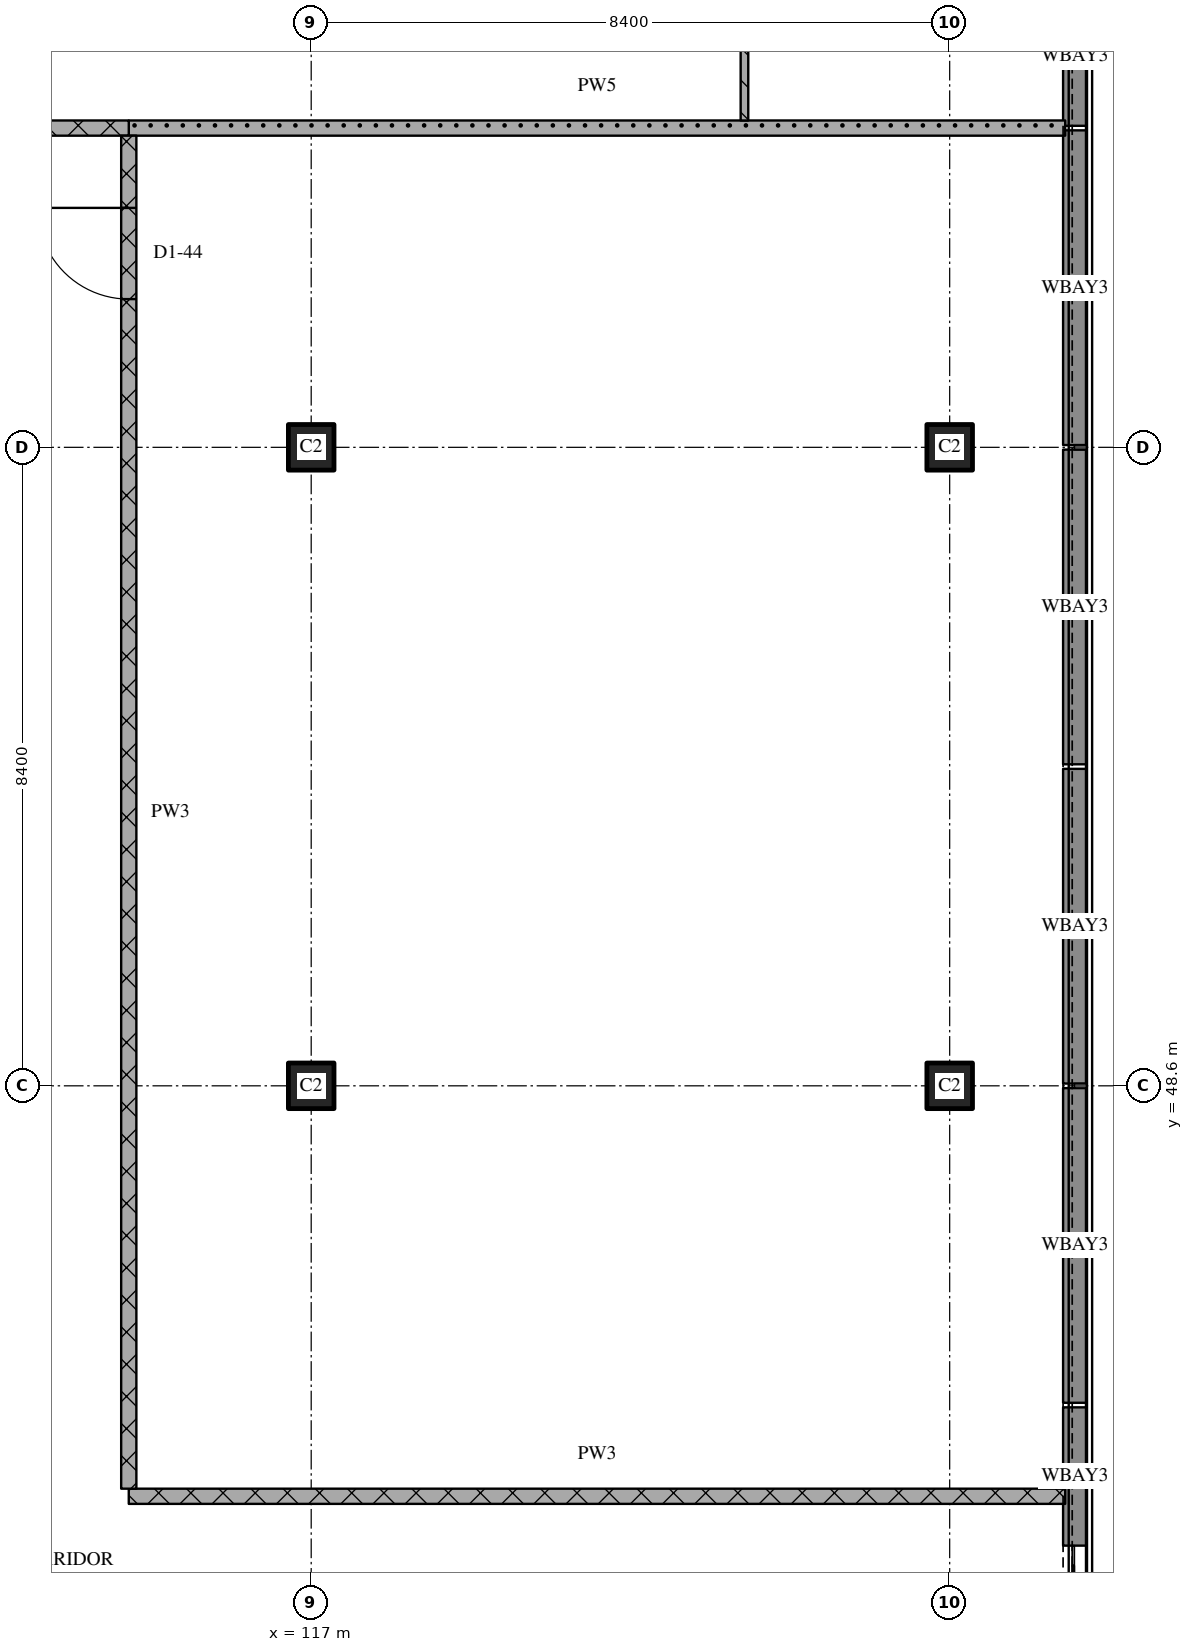
"""IFC4 building model, lengths in metres.
Left out: names, types, materials, properties, quantities, classifications, styles, units other than length and angle.
Written with IfcOpenShell. Run it as: python <this file> out.ifc"""

import sys

from ifc_helpers import new_model, si_unit, direction, frame, frame_2d, origin, origin_2d, place, context, subcontext, project, spatial, rectangle, extrude, element, fill, save


model = new_model("IFC4")
c1 = context("Model", 3, precision=1e-05, world=origin(), true_north=direction((0.0, 1.0)))
c2 = subcontext(c1, "Body", "Model", "MODEL_VIEW")
j1 = project(units=[si_unit("LENGTHUNIT", "METRE"), si_unit("PLANEANGLEUNIT", "RADIAN")], contexts=[c1])
p1 = place(None, origin())
s1 = spatial("IfcSite", under=j1, at=p1, CompositionType="ELEMENT")
p2 = place(p1, origin())
s2 = spatial("IfcBuilding", under=s1, at=p2, CompositionType="ELEMENT")
p3 = place(p2, frame((0.0, 0.0, 205.5)))
s3 = spatial("IfcBuildingStorey", under=s2, at=p3, CompositionType="ELEMENT", Elevation=205.5)
for number, where, z_axis, x_axis in (
    (1, (117.0, 48.6, 0.0), (0.0, 0.0, 1.0), (1.0, 0.0, 0.0)),
    (2, (117.0, 57.0, 0.0), (0.0, 0.0, 1.0), (1.0, 0.0, 0.0)),
    (3, (125.4, 48.6, 0.0), (0.0, 0.0, 1.0), (1.0, 0.0, 0.0)),
    (4, (125.4, 57.0, 0.0), (0.0, 0.0, 1.0), (1.0, 0.0, 0.0)),
):
    element("IfcColumn", number, at=place(p3, frame(where, z_axis=z_axis, x_axis=x_axis)), inside=s3, PredefinedType="COLUMN", context=c2, shape_type="SweptSolid", body=[
        extrude(rectangle(XDim=0.6, YDim=0.6, at=origin_2d()), origin(), (0.0, 0.0, 1.0), 3.6),
    ])
p4 = place(p3, frame((127.046, 44.37, 0.0), z_axis=(0.0, 0.0, 1.0), x_axis=(0.0, -1.0, 0.0)))
e5 = element("IfcWall", 5, at=p4, inside=s3, PredefinedType="SOLIDWALL", context=c2, shape_type="SweptSolid", body=[
    extrude(rectangle(XDim=1.819, YDim=0.308, at=frame_2d((0.91, 0.0))), origin(), (0.0, 0.0, 1.0), 3.2),
])
for number, where, z_axis, x_axis in (
    (6, (127.046, 48.57, 0.0), (0.0, 0.0, 1.0), (0.0, -1.0, 0.0)),
    (7, (127.046, 52.77, 0.0), (0.0, 0.0, 1.0), (0.0, -1.0, 0.0)),
):
    element("IfcWall", number, at=place(p3, frame(where, z_axis=z_axis, x_axis=x_axis)), inside=s3, PredefinedType="SOLIDWALL", context=c2, shape_type="SweptSolid", body=[
        extrude(rectangle(XDim=4.14, YDim=0.308, at=frame_2d((2.07, 0.0))), origin(), (0.0, 0.0, 1.0), 3.2),
    ])
for number, where, z_axis, x_axis in (
    (8, (127.046, 56.97, 0.0), (0.0, 0.0, 1.0), (0.0, -1.0, 0.0)),
    (9, (127.046, 61.17, 0.0), (0.0, 0.0, 1.0), (0.0, -1.0, 0.0)),
):
    element("IfcWall", number, at=place(p3, frame(where, z_axis=z_axis, x_axis=x_axis)), inside=s3, PredefinedType="SOLIDWALL", context=c2, shape_type="SweptSolid", body=[
        extrude(rectangle(XDim=4.14, YDim=0.308, at=frame_2d((2.07, 0.0))), origin(), (0.0, 0.0, 1.0), 3.2),
    ])
p5 = place(p3, frame((127.046, 63.049, 0.0), z_axis=(0.0, 0.0, 1.0), x_axis=(0.0, -1.0, 0.0)))
e10 = element("IfcWall", 10, at=p5, inside=s3, PredefinedType="SOLIDWALL", context=c2, shape_type="SweptSolid", body=[
    extrude(rectangle(XDim=1.819, YDim=0.308, at=frame_2d((0.91, 0.0))), origin(), (0.0, 0.0, 1.0), 3.2),
])
p6 = place(p3, frame((114.6, 43.2, 0.0), z_axis=(0.0, 0.0, 1.0), x_axis=(1.0, 0.0, 0.0)))
e11 = element("IfcWall", 11, at=p6, inside=s3, PredefinedType="PARTITIONING", context=c2, shape_type="SweptSolid", body=[
    extrude(rectangle(XDim=12.32, YDim=0.2, at=frame_2d((6.16, 0.0))), origin(), (0.0, 0.0, 1.0), 3.32),
])
p7 = place(p3, frame((111.0, 61.2, 0.0), z_axis=(0.0, 0.0, 1.0), x_axis=(1.0, 0.0, 0.0)))
e12 = element("IfcWall", 12, at=p7, inside=s3, PredefinedType="PARTITIONING", context=c2, shape_type="SweptSolid", body=[
    extrude(rectangle(XDim=3.6, YDim=0.2, at=frame_2d((1.8, 0.0))), origin(), (0.0, 0.0, 1.0), 3.32),
])
p8 = place(p3, frame((114.6, 61.2, 0.0), z_axis=(0.0, 0.0, 1.0), x_axis=(1.0, 0.0, 0.0)))
e13 = element("IfcWall", 13, at=p8, inside=s3, PredefinedType="PARTITIONING", context=c2, shape_type="SweptSolid", body=[
    extrude(rectangle(XDim=12.32, YDim=0.2, at=frame_2d((6.16, 0.0))), origin(), (0.0, 0.0, 1.0), 3.32),
])
p9 = place(p3, frame((114.6, 61.1, 0.0), z_axis=(0.0, 0.0, 1.0), x_axis=(0.0, -1.0, 0.0)))
e14 = element("IfcWall", 14, at=p9, inside=s3, PredefinedType="PARTITIONING", context=c2, shape_type="SweptSolid", body=[
    extrude(rectangle(XDim=17.8, YDim=0.2, at=frame_2d((8.9, 0.0))), origin(), (0.0, 0.0, 1.0), 3.32),
])
p10 = place(p9, frame((0.95, 0.0, 0.0)))
e15 = element("IfcOpeningElement", 15, at=p10, cuts=e14, PredefinedType="OPENING", context=c2, shape_type="SweptSolid", body=[
    extrude(rectangle(XDim=1.2, YDim=2.1, at=frame_2d((0.6, 1.05))), frame((0.0, 0.11, 0.0), z_axis=(0.0, -1.0, 0.0), x_axis=(1.0, 0.0, 0.0)), (0.0, 0.0, 1.0), 0.22),
])
p11 = place(p3, frame((122.7, 69.55, 0.0), z_axis=(0.0, 0.0, 1.0), x_axis=(0.0, -1.0, 0.0)))
e16 = element("IfcWall", 16, at=p11, inside=s3, PredefinedType="PARTITIONING", context=c2, shape_type="SweptSolid", body=[
    extrude(rectangle(XDim=8.25, YDim=0.1, at=frame_2d((4.125, 0.0))), origin(), (0.0, 0.0, 1.0), 3.32),
])
p12 = place(p10, origin())
e17 = element("IfcDoor", 17, at=p12, inside=s3, OperationType="SINGLE_SWING_RIGHT", PredefinedType="DOOR", context=c2, shape_type="SweptSolid", body=[
    extrude(rectangle(XDim=1.2, YDim=2.1, at=frame_2d((0.6, 1.05))), frame((0.0, 0.025, 0.0), z_axis=(0.0, -1.0, 0.0), x_axis=(1.0, 0.0, 0.0)), (0.0, 0.0, 1.0), 0.05),
])
fill(e15, e17)
save(model, sys.argv[1])
